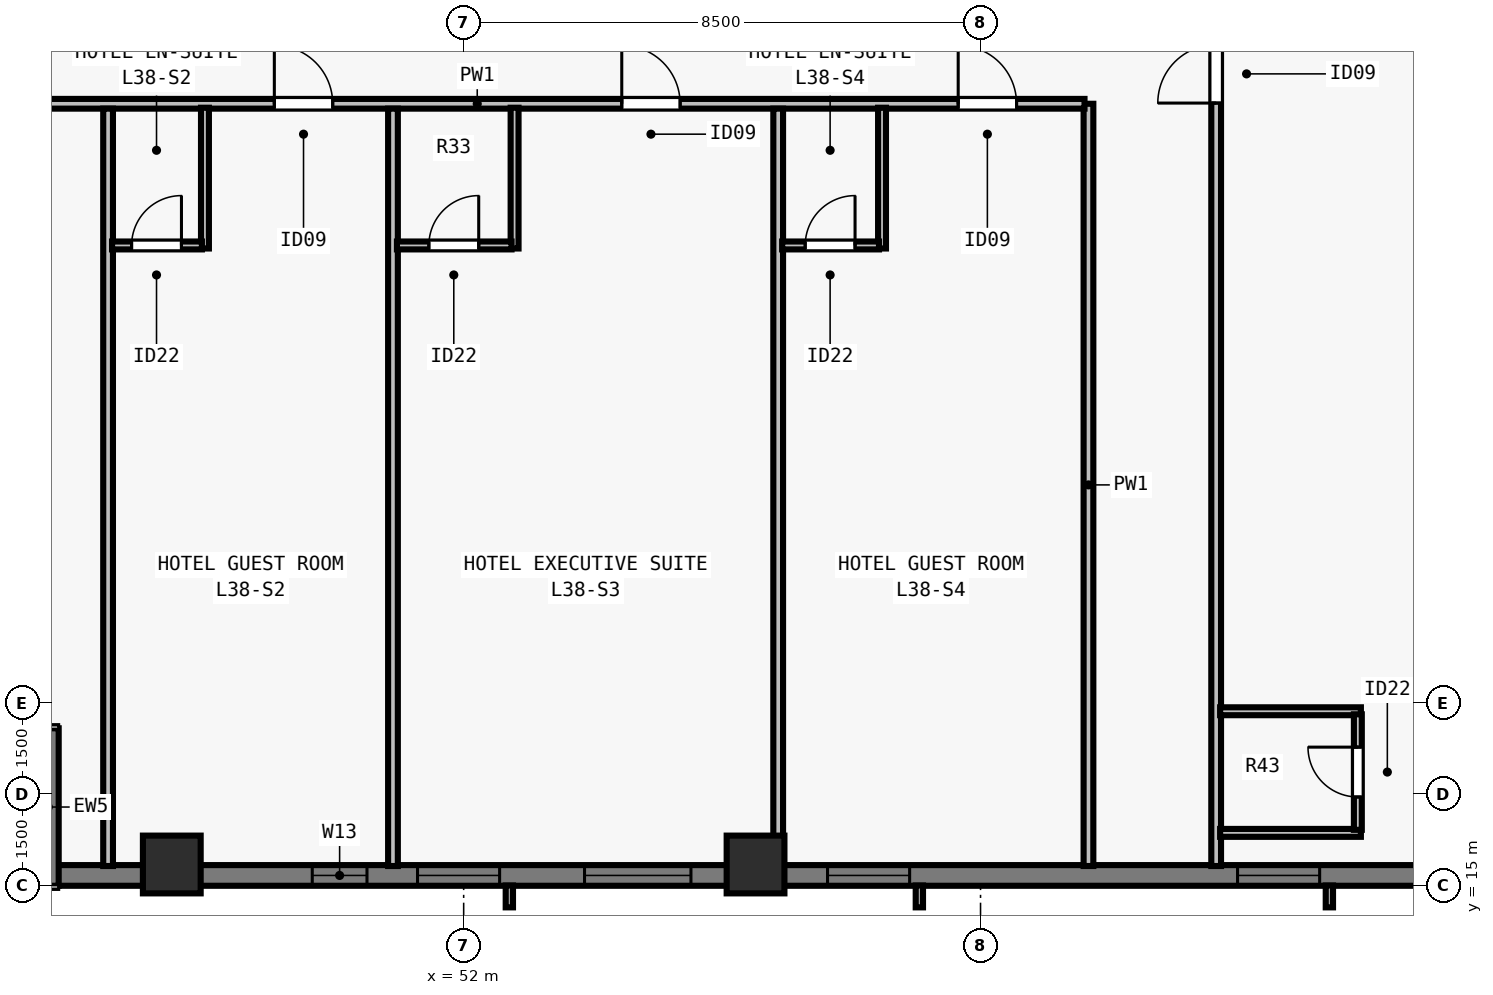
"""IFC4 building model, lengths in metres.
Left out: names, types, materials, properties, quantities, classifications, styles, units other than length and angle.
Written with IfcOpenShell. Run it as: python <this file> out.ifc"""

import sys

from ifc_helpers import new_model, si_unit, direction, frame, frame_2d, origin, origin_2d, place, context, subcontext, project, spatial, rectangle, extrude, element, fill, save


model = new_model("IFC4")
c1 = context("Model", 3, precision=1e-05, world=origin(), true_north=direction((0.0, 1.0)))
c2 = subcontext(c1, "Body", "Model", "MODEL_VIEW")
j1 = project(units=[si_unit("LENGTHUNIT", "METRE"), si_unit("PLANEANGLEUNIT", "RADIAN")], contexts=[c1])
p1 = place(None, origin())
s1 = spatial("IfcSite", under=j1, at=p1, CompositionType="ELEMENT")
p2 = place(p1, origin())
s2 = spatial("IfcBuilding", under=s1, at=p2, CompositionType="ELEMENT")
p3 = place(p2, frame((0.0, 0.0, 141.0)))
s3 = spatial("IfcBuildingStorey", under=s2, at=p3, CompositionType="ELEMENT", Elevation=141.0)
for number, where, z_axis, x_axis in (
    (1, (47.2, 15.35, 0.0), (0.0, 0.0, 1.0), (1.0, 0.0, 0.0)),
    (2, (56.8, 15.35, 0.0), (0.0, 0.0, 1.0), (1.0, 0.0, 0.0)),
):
    element("IfcColumn", number, at=place(p3, frame(where, z_axis=z_axis, x_axis=x_axis)), inside=s3, PredefinedType="COLUMN", context=c2, shape_type="SweptSolid", body=[
        extrude(rectangle(XDim=0.95, YDim=0.95, at=origin_2d()), origin(), (0.0, 0.0, 1.0), 3.5),
    ])
p4 = place(p3, frame((72.0, 15.17, 0.0), z_axis=(0.0, 0.0, 1.0), x_axis=(-1.0, 0.0, 0.0)))
e3 = element("IfcWall", 3, at=p4, inside=s3, PredefinedType="SOLIDWALL", context=c2, shape_type="SweptSolid", body=[
    extrude(rectangle(XDim=26.682, YDim=0.34, at=frame_2d((13.341, 0.0))), origin(), (0.0, 0.0, 1.0), 3.28),
])
p5 = place(p4, frame((5.923, 0.0, 0.8)))
e4 = element("IfcOpeningElement", 4, at=p5, cuts=e3, PredefinedType="OPENING", context=c2, shape_type="SweptSolid", body=[
    extrude(rectangle(XDim=1.35, YDim=1.66, at=frame_2d((0.675, 0.83))), frame((0.0, 0.18, 0.0), z_axis=(0.0, -1.0, 0.0), x_axis=(1.0, 0.0, 0.0)), (0.0, 0.0, 1.0), 0.36),
])
p6 = place(p4, frame((12.666, 0.0, 0.8)))
e5 = element("IfcOpeningElement", 5, at=p6, cuts=e3, PredefinedType="OPENING", context=c2, shape_type="SweptSolid", body=[
    extrude(rectangle(XDim=1.35, YDim=1.66, at=frame_2d((0.675, 0.83))), frame((0.0, 0.18, 0.0), z_axis=(0.0, -1.0, 0.0), x_axis=(1.0, 0.0, 0.0)), (0.0, 0.0, 1.0), 0.36),
])
p7 = place(p4, frame((16.262, 0.0, 0.8)))
e6 = element("IfcOpeningElement", 6, at=p7, cuts=e3, PredefinedType="OPENING", context=c2, shape_type="SweptSolid", body=[
    extrude(rectangle(XDim=1.75, YDim=1.66, at=frame_2d((0.875, 0.83))), frame((0.0, 0.18, 0.0), z_axis=(0.0, -1.0, 0.0), x_axis=(1.0, 0.0, 0.0)), (0.0, 0.0, 1.0), 0.36),
])
p8 = place(p4, frame((19.409, 0.0, 0.8)))
e7 = element("IfcOpeningElement", 7, at=p8, cuts=e3, PredefinedType="OPENING", context=c2, shape_type="SweptSolid", body=[
    extrude(rectangle(XDim=1.35, YDim=1.66, at=frame_2d((0.675, 0.83))), frame((0.0, 0.18, 0.0), z_axis=(0.0, -1.0, 0.0), x_axis=(1.0, 0.0, 0.0)), (0.0, 0.0, 1.0), 0.36),
])
p9 = place(p4, frame((21.59, 0.0, 0.8)))
e8 = element("IfcOpeningElement", 8, at=p9, cuts=e3, PredefinedType="OPENING", context=c2, shape_type="SweptSolid", body=[
    extrude(rectangle(XDim=0.9, YDim=1.66, at=frame_2d((0.45, 0.83))), frame((0.0, 0.18, 0.0), z_axis=(0.0, -1.0, 0.0), x_axis=(1.0, 0.0, 0.0)), (0.0, 0.0, 1.0), 0.36),
])
p10 = place(p3, frame((45.17, 15.0, 0.0), z_axis=(0.0, 0.0, 1.0), x_axis=(0.0, 1.0, 0.0)))
e9 = element("IfcWall", 9, at=p10, inside=s3, PredefinedType="SOLIDWALL", context=c2, shape_type="SweptSolid", body=[
    extrude(rectangle(XDim=2.59, YDim=0.34, at=frame_2d((1.295, 0.0))), origin(), (0.0, 0.0, 1.0), 3.28),
])
p11 = place(p3, frame((64.375, 15.325, 0.0), z_axis=(0.0, 0.0, 1.0), x_axis=(0.0, 1.0, 0.0)))
e10 = element("IfcWall", 10, at=p11, inside=s3, PredefinedType="PARTITIONING", context=c2, shape_type="SweptSolid", body=[
    extrude(rectangle(XDim=47.35, YDim=0.16, at=frame_2d((23.675, 0.0))), origin(), (0.0, 0.0, 1.0), 2.555),
])
p12 = place(p11, frame((12.547, 0.0, 0.0)))
e11 = element("IfcOpeningElement", 11, at=p12, cuts=e10, PredefinedType="OPENING", context=c2, shape_type="SweptSolid", body=[
    extrude(rectangle(XDim=0.96, YDim=2.15, at=frame_2d((0.48, 1.075))), frame((0.0, 0.09, 0.0), z_axis=(0.0, -1.0, 0.0), x_axis=(1.0, 0.0, 0.0)), (0.0, 0.0, 1.0), 0.18),
])
p13 = place(p11, frame((35.902, 0.0, 0.0)))
e12 = element("IfcOpeningElement", 12, at=p13, cuts=e10, PredefinedType="OPENING", context=c2, shape_type="SweptSolid", body=[
    extrude(rectangle(XDim=0.96, YDim=2.15, at=frame_2d((0.48, 1.075))), frame((0.0, 0.09, 0.0), z_axis=(0.0, -1.0, 0.0), x_axis=(1.0, 0.0, 0.0)), (0.0, 0.0, 1.0), 0.18),
])
p14 = place(p3, frame((62.275, 15.325, 0.0), z_axis=(0.0, 0.0, 1.0), x_axis=(0.0, 1.0, 0.0)))
e13 = element("IfcWall", 13, at=p14, inside=s3, PredefinedType="PARTITIONING", context=c2, shape_type="SweptSolid", body=[
    extrude(rectangle(XDim=12.535, YDim=0.16, at=frame_2d((6.268, 0.0))), origin(), (0.0, 0.0, 1.0), 3.28),
])
p15 = place(p3, frame((40.14, 27.86, 0.0), z_axis=(0.0, 0.0, 1.0), x_axis=(1.0, 0.0, 0.0)))
e14 = element("IfcWall", 14, at=p15, inside=s3, PredefinedType="PARTITIONING", context=c2, shape_type="SweptSolid", body=[
    extrude(rectangle(XDim=22.07, YDim=0.16, at=frame_2d((11.035, 0.0))), origin(), (0.0, 0.0, 1.0), 3.28),
])
p16 = place(p15, frame((3.834, 0.0, 0.0)))
e15 = element("IfcOpeningElement", 15, at=p16, cuts=e14, PredefinedType="OPENING", context=c2, shape_type="SweptSolid", body=[
    extrude(rectangle(XDim=0.96, YDim=2.15, at=frame_2d((0.48, 1.075))), frame((0.0, 0.09, 0.0), z_axis=(0.0, -1.0, 0.0), x_axis=(1.0, 0.0, 0.0)), (0.0, 0.0, 1.0), 0.18),
])
p17 = place(p15, frame((8.746, 0.0, 0.0)))
e16 = element("IfcOpeningElement", 16, at=p17, cuts=e14, PredefinedType="OPENING", context=c2, shape_type="SweptSolid", body=[
    extrude(rectangle(XDim=0.96, YDim=2.15, at=frame_2d((0.48, 1.075))), frame((0.0, 0.09, 0.0), z_axis=(0.0, -1.0, 0.0), x_axis=(1.0, 0.0, 0.0)), (0.0, 0.0, 1.0), 0.18),
])
p18 = place(p15, frame((14.46, 0.0, 0.0)))
e17 = element("IfcOpeningElement", 17, at=p18, cuts=e14, PredefinedType="OPENING", context=c2, shape_type="SweptSolid", body=[
    extrude(rectangle(XDim=0.96, YDim=2.15, at=frame_2d((0.48, 1.075))), frame((0.0, 0.09, 0.0), z_axis=(0.0, -1.0, 0.0), x_axis=(1.0, 0.0, 0.0)), (0.0, 0.0, 1.0), 0.18),
])
p19 = place(p15, frame((19.993, 0.0, 0.0)))
e18 = element("IfcOpeningElement", 18, at=p19, cuts=e14, PredefinedType="OPENING", context=c2, shape_type="SweptSolid", body=[
    extrude(rectangle(XDim=0.96, YDim=2.15, at=frame_2d((0.48, 1.075))), frame((0.0, 0.09, 0.0), z_axis=(0.0, -1.0, 0.0), x_axis=(1.0, 0.0, 0.0)), (0.0, 0.0, 1.0), 0.18),
])
p20 = place(p3, frame((46.153, 15.325, 0.0), z_axis=(0.0, 0.0, 1.0), x_axis=(0.0, 1.0, 0.0)))
e19 = element("IfcWall", 19, at=p20, inside=s3, PredefinedType="PARTITIONING", context=c2, shape_type="SweptSolid", body=[
    extrude(rectangle(XDim=12.455, YDim=0.16, at=frame_2d((6.228, 0.0))), origin(), (0.0, 0.0, 1.0), 3.28),
])
p21 = place(p3, frame((47.745, 25.48, 0.0), z_axis=(0.0, 0.0, 1.0), x_axis=(0.0, 1.0, 0.0)))
e20 = element("IfcWall", 20, at=p21, inside=s3, PredefinedType="PLUMBINGWALL", context=c2, shape_type="SweptSolid", body=[
    extrude(rectangle(XDim=2.315, YDim=0.13, at=frame_2d((1.157, 0.0))), origin(), (0.0, 0.0, 1.0), 3.28),
])
p22 = place(p3, frame((46.218, 25.53, 0.0), z_axis=(0.0, 0.0, 1.0), x_axis=(1.0, 0.0, 0.0)))
e21 = element("IfcWall", 21, at=p22, inside=s3, PredefinedType="PLUMBINGWALL", context=c2, shape_type="SweptSolid", body=[
    extrude(rectangle(XDim=1.478, YDim=0.13, at=frame_2d((0.739, 0.0))), origin(), (0.0, 0.0, 1.0), 3.28),
])
p23 = place(p22, frame((0.321, 0.0, 0.0)))
e22 = element("IfcOpeningElement", 22, at=p23, cuts=e21, PredefinedType="OPENING", context=c2, shape_type="SweptSolid", body=[
    extrude(rectangle(XDim=0.82, YDim=2.1, at=frame_2d((0.41, 1.05))), frame((0.0, 0.075, 0.0), z_axis=(0.0, -1.0, 0.0), x_axis=(1.0, 0.0, 0.0)), (0.0, 0.0, 1.0), 0.15),
])
p24 = place(p3, frame((50.837, 15.325, 0.0), z_axis=(0.0, 0.0, 1.0), x_axis=(0.0, 1.0, 0.0)))
e23 = element("IfcWall", 23, at=p24, inside=s3, PredefinedType="PARTITIONING", context=c2, shape_type="SweptSolid", body=[
    extrude(rectangle(XDim=12.455, YDim=0.16, at=frame_2d((6.228, 0.0))), origin(), (0.0, 0.0, 1.0), 2.896),
])
p25 = place(p3, frame((52.837, 25.48, 0.0), z_axis=(0.0, 0.0, 1.0), x_axis=(0.0, 1.0, 0.0)))
e24 = element("IfcWall", 24, at=p25, inside=s3, PredefinedType="PLUMBINGWALL", context=c2, shape_type="SweptSolid", body=[
    extrude(rectangle(XDim=2.315, YDim=0.13, at=frame_2d((1.157, 0.0))), origin(), (0.0, 0.0, 1.0), 3.28),
])
p26 = place(p3, frame((50.903, 25.53, 0.0), z_axis=(0.0, 0.0, 1.0), x_axis=(1.0, 0.0, 0.0)))
e25 = element("IfcWall", 25, at=p26, inside=s3, PredefinedType="PLUMBINGWALL", context=c2, shape_type="SweptSolid", body=[
    extrude(rectangle(XDim=1.885, YDim=0.13, at=frame_2d((0.942, 0.0))), origin(), (0.0, 0.0, 1.0), 3.28),
])
p27 = place(p26, frame((0.525, 0.0, 0.0)))
e26 = element("IfcOpeningElement", 26, at=p27, cuts=e25, PredefinedType="OPENING", context=c2, shape_type="SweptSolid", body=[
    extrude(rectangle(XDim=0.82, YDim=2.1, at=frame_2d((0.41, 1.05))), frame((0.0, 0.075, 0.0), z_axis=(0.0, -1.0, 0.0), x_axis=(1.0, 0.0, 0.0)), (0.0, 0.0, 1.0), 0.15),
])
p28 = place(p3, frame((57.173, 15.325, 0.0), z_axis=(0.0, 0.0, 1.0), x_axis=(0.0, 1.0, 0.0)))
e27 = element("IfcWall", 27, at=p28, inside=s3, PredefinedType="PARTITIONING", context=c2, shape_type="SweptSolid", body=[
    extrude(rectangle(XDim=12.455, YDim=0.16, at=frame_2d((6.228, 0.0))), origin(), (0.0, 0.0, 1.0), 3.28),
])
p29 = place(p3, frame((58.88, 25.48, 0.0), z_axis=(0.0, 0.0, 1.0), x_axis=(0.0, 1.0, 0.0)))
e28 = element("IfcWall", 28, at=p29, inside=s3, PredefinedType="PLUMBINGWALL", context=c2, shape_type="SweptSolid", body=[
    extrude(rectangle(XDim=2.315, YDim=0.13, at=frame_2d((1.157, 0.0))), origin(), (0.0, 0.0, 1.0), 3.28),
])
p30 = place(p3, frame((57.238, 25.53, 0.0), z_axis=(0.0, 0.0, 1.0), x_axis=(1.0, 0.0, 0.0)))
e29 = element("IfcWall", 29, at=p30, inside=s3, PredefinedType="PLUMBINGWALL", context=c2, shape_type="SweptSolid", body=[
    extrude(rectangle(XDim=1.593, YDim=0.13, at=frame_2d((0.796, 0.0))), origin(), (0.0, 0.0, 1.0), 3.28),
])
p31 = place(p30, frame((0.379, 0.0, 0.0)))
e30 = element("IfcOpeningElement", 30, at=p31, cuts=e29, PredefinedType="OPENING", context=c2, shape_type="SweptSolid", body=[
    extrude(rectangle(XDim=0.82, YDim=2.1, at=frame_2d((0.41, 1.05))), frame((0.0, 0.075, 0.0), z_axis=(0.0, -1.0, 0.0), x_axis=(1.0, 0.0, 0.0)), (0.0, 0.0, 1.0), 0.15),
])
for number, where, z_axis, x_axis in (
    (31, (64.44, 15.87, 0.0), (0.0, 0.0, 1.0), (1.0, 0.0, 0.0)),
    (32, (64.44, 17.87, 0.0), (0.0, 0.0, 1.0), (1.0, 0.0, 0.0)),
):
    element("IfcWall", number, at=place(p3, frame(where, z_axis=z_axis, x_axis=x_axis)), inside=s3, PredefinedType="PLUMBINGWALL", context=c2, shape_type="SweptSolid", body=[
        extrude(rectangle(XDim=2.315, YDim=0.13, at=frame_2d((1.157, 0.0))), origin(), (0.0, 0.0, 1.0), 3.28),
    ])
p32 = place(p3, frame((66.705, 15.92, 0.0), z_axis=(0.0, 0.0, 1.0), x_axis=(0.0, 1.0, 0.0)))
e33 = element("IfcWall", 33, at=p32, inside=s3, PredefinedType="PLUMBINGWALL", context=c2, shape_type="SweptSolid", body=[
    extrude(rectangle(XDim=1.9, YDim=0.13, at=frame_2d((0.95, 0.0))), origin(), (0.0, 0.0, 1.0), 3.28),
])
p33 = place(p32, frame((0.54, 0.0, 0.0)))
e34 = element("IfcOpeningElement", 34, at=p33, cuts=e33, PredefinedType="OPENING", context=c2, shape_type="SweptSolid", body=[
    extrude(rectangle(XDim=0.82, YDim=2.1, at=frame_2d((0.41, 1.05))), frame((0.0, 0.075, 0.0), z_axis=(0.0, -1.0, 0.0), x_axis=(1.0, 0.0, 0.0)), (0.0, 0.0, 1.0), 0.15),
])
p34 = place(p5, origin())
e35 = element("IfcWindow", 35, at=p34, inside=s3, PartitioningType="SINGLE_PANEL", PredefinedType="WINDOW", context=c2, shape_type="SweptSolid", body=[
    extrude(rectangle(XDim=1.35, YDim=1.66, at=frame_2d((0.675, 0.83))), frame((0.0, -0.05, 0.0), z_axis=(0.0, -1.0, 0.0), x_axis=(1.0, 0.0, 0.0)), (0.0, 0.0, 1.0), 0.06),
])
fill(e4, e35)
p35 = place(p6, origin())
e36 = element("IfcWindow", 36, at=p35, inside=s3, PartitioningType="SINGLE_PANEL", PredefinedType="WINDOW", context=c2, shape_type="SweptSolid", body=[
    extrude(rectangle(XDim=1.35, YDim=1.66, at=frame_2d((0.675, 0.83))), frame((0.0, -0.05, 0.0), z_axis=(0.0, -1.0, 0.0), x_axis=(1.0, 0.0, 0.0)), (0.0, 0.0, 1.0), 0.06),
])
fill(e5, e36)
p36 = place(p7, origin())
e37 = element("IfcWindow", 37, at=p36, inside=s3, PartitioningType="SINGLE_PANEL", PredefinedType="WINDOW", context=c2, shape_type="SweptSolid", body=[
    extrude(rectangle(XDim=1.75, YDim=1.66, at=frame_2d((0.875, 0.83))), frame((0.0, -0.05, 0.0), z_axis=(0.0, -1.0, 0.0), x_axis=(1.0, 0.0, 0.0)), (0.0, 0.0, 1.0), 0.06),
])
fill(e6, e37)
p37 = place(p8, origin())
e38 = element("IfcWindow", 38, at=p37, inside=s3, PartitioningType="SINGLE_PANEL", PredefinedType="WINDOW", context=c2, shape_type="SweptSolid", body=[
    extrude(rectangle(XDim=1.35, YDim=1.66, at=frame_2d((0.675, 0.83))), frame((0.0, -0.05, 0.0), z_axis=(0.0, -1.0, 0.0), x_axis=(1.0, 0.0, 0.0)), (0.0, 0.0, 1.0), 0.06),
])
fill(e7, e38)
p38 = place(p9, origin())
e39 = element("IfcWindow", 39, at=p38, inside=s3, PartitioningType="SINGLE_PANEL", PredefinedType="WINDOW", context=c2, shape_type="SweptSolid", body=[
    extrude(rectangle(XDim=0.9, YDim=1.66, at=frame_2d((0.45, 0.83))), frame((0.0, -0.04, 0.0), z_axis=(0.0, -1.0, 0.0), x_axis=(1.0, 0.0, 0.0)), (0.0, 0.0, 1.0), 0.06),
])
fill(e8, e39)
p39 = place(p23, origin())
e40 = element("IfcDoor", 40, at=p39, inside=s3, OperationType="SINGLE_SWING_RIGHT", PredefinedType="DOOR", context=c2, shape_type="SweptSolid", body=[
    extrude(rectangle(XDim=0.82, YDim=2.1, at=frame_2d((0.41, 1.05))), frame((0.0, 0.025, 0.0), z_axis=(0.0, -1.0, 0.0), x_axis=(1.0, 0.0, 0.0)), (0.0, 0.0, 1.0), 0.05),
])
fill(e22, e40)
p40 = place(p17, origin())
e41 = element("IfcDoor", 41, at=p40, inside=s3, OperationType="SINGLE_SWING_LEFT", PredefinedType="DOOR", context=c2, shape_type="SweptSolid", body=[
    extrude(rectangle(XDim=0.96, YDim=2.15, at=frame_2d((0.48, 1.075))), frame((0.0, 0.025, 0.0), z_axis=(0.0, -1.0, 0.0), x_axis=(1.0, 0.0, 0.0)), (0.0, 0.0, 1.0), 0.05),
])
fill(e16, e41)
p41 = place(p27, origin())
e42 = element("IfcDoor", 42, at=p41, inside=s3, OperationType="SINGLE_SWING_RIGHT", PredefinedType="DOOR", context=c2, shape_type="SweptSolid", body=[
    extrude(rectangle(XDim=0.82, YDim=2.1, at=frame_2d((0.41, 1.05))), frame((0.0, 0.025, 0.0), z_axis=(0.0, -1.0, 0.0), x_axis=(1.0, 0.0, 0.0)), (0.0, 0.0, 1.0), 0.05),
])
fill(e26, e42)
p42 = place(p18, origin())
e43 = element("IfcDoor", 43, at=p42, inside=s3, OperationType="SINGLE_SWING_LEFT", PredefinedType="DOOR", context=c2, shape_type="SweptSolid", body=[
    extrude(rectangle(XDim=0.96, YDim=2.15, at=frame_2d((0.48, 1.075))), frame((0.0, 0.025, 0.0), z_axis=(0.0, -1.0, 0.0), x_axis=(1.0, 0.0, 0.0)), (0.0, 0.0, 1.0), 0.05),
])
fill(e17, e43)
p43 = place(p31, origin())
e44 = element("IfcDoor", 44, at=p43, inside=s3, OperationType="SINGLE_SWING_RIGHT", PredefinedType="DOOR", context=c2, shape_type="SweptSolid", body=[
    extrude(rectangle(XDim=0.82, YDim=2.1, at=frame_2d((0.41, 1.05))), frame((0.0, 0.025, 0.0), z_axis=(0.0, -1.0, 0.0), x_axis=(1.0, 0.0, 0.0)), (0.0, 0.0, 1.0), 0.05),
])
fill(e30, e44)
p44 = place(p19, origin())
e45 = element("IfcDoor", 45, at=p44, inside=s3, OperationType="SINGLE_SWING_LEFT", PredefinedType="DOOR", context=c2, shape_type="SweptSolid", body=[
    extrude(rectangle(XDim=0.96, YDim=2.15, at=frame_2d((0.48, 1.075))), frame((0.0, 0.025, 0.0), z_axis=(0.0, -1.0, 0.0), x_axis=(1.0, 0.0, 0.0)), (0.0, 0.0, 1.0), 0.05),
])
fill(e18, e45)
p45 = place(p33, origin())
e46 = element("IfcDoor", 46, at=p45, inside=s3, OperationType="SINGLE_SWING_RIGHT", PredefinedType="DOOR", context=c2, shape_type="SweptSolid", body=[
    extrude(rectangle(XDim=0.82, YDim=2.1, at=frame_2d((0.41, 1.05))), frame((0.0, 0.025, 0.0), z_axis=(0.0, -1.0, 0.0), x_axis=(1.0, 0.0, 0.0)), (0.0, 0.0, 1.0), 0.05),
])
fill(e34, e46)
p46 = place(p12, origin())
e47 = element("IfcDoor", 47, at=p46, inside=s3, OperationType="SINGLE_SWING_LEFT", PredefinedType="DOOR", context=c2, shape_type="SweptSolid", body=[
    extrude(rectangle(XDim=0.96, YDim=2.15, at=frame_2d((0.48, 1.075))), frame((0.0, 0.025, 0.0), z_axis=(0.0, -1.0, 0.0), x_axis=(1.0, 0.0, 0.0)), (0.0, 0.0, 1.0), 0.05),
])
fill(e11, e47)
save(model, sys.argv[1])
